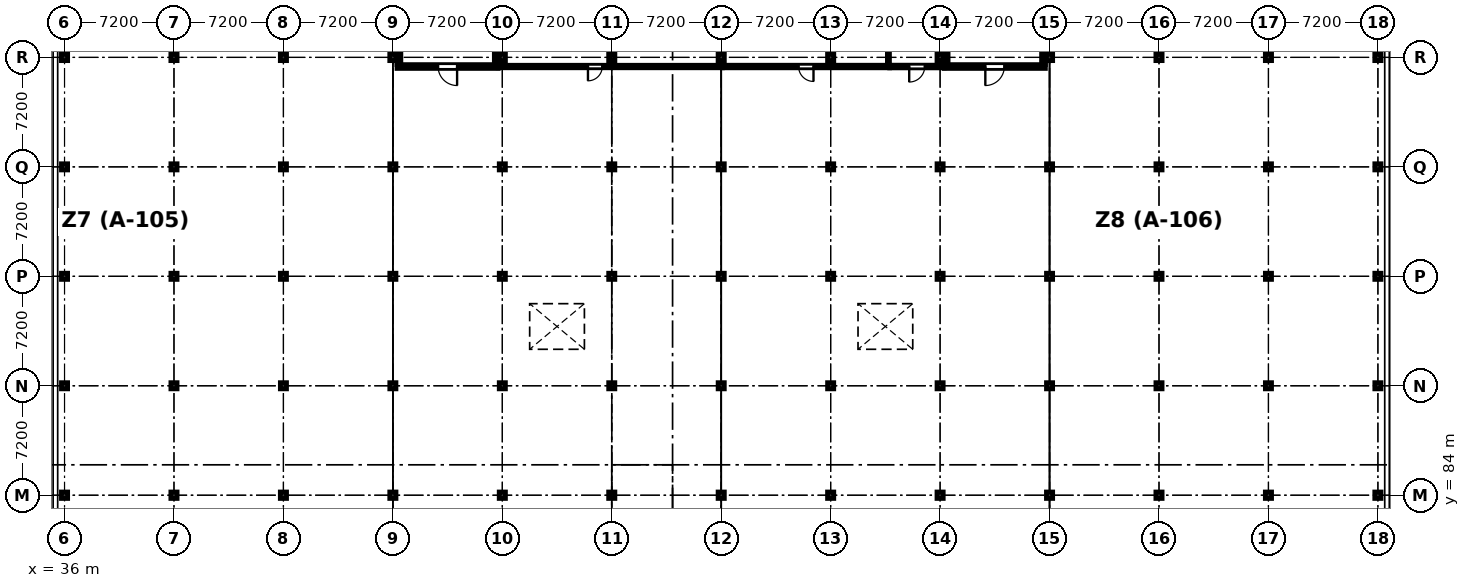
"""IFC4 building model, lengths in metres.
Left out: names, types, materials, properties, quantities, classifications, styles, units other than length and angle.
Written with IfcOpenShell. Run it as: python <this file> out.ifc"""

import sys

from ifc_helpers import new_model, si_unit, direction, frame, frame_2d, origin, origin_2d, place, context, subcontext, project, spatial, rectangle, i_section, extrude, element, fill, save


model = new_model("IFC4")
c1 = context("Model", 3, precision=1e-05, world=origin(), true_north=direction((0.0, 1.0)))
c2 = subcontext(c1, "Body", "Model", "MODEL_VIEW")
j1 = project(units=[si_unit("LENGTHUNIT", "METRE"), si_unit("PLANEANGLEUNIT", "RADIAN")], contexts=[c1])
p1 = place(None, origin())
s1 = spatial("IfcSite", under=j1, at=p1, CompositionType="ELEMENT")
p2 = place(p1, origin())
s2 = spatial("IfcBuilding", under=s1, at=p2, CompositionType="ELEMENT")
p3 = place(p2, frame((0.0, 0.0, -4.5)))
s3 = spatial("IfcBuildingStorey", under=s2, at=p3, CompositionType="ELEMENT", Elevation=-4.5)
p4 = place(p3, frame((36.0, 84.0, 0.0), z_axis=(0.0, 0.0, 1.0), x_axis=(1.0, 0.0, 0.0)))
e1 = element("IfcColumn", 1, at=p4, inside=s3, PredefinedType="COLUMN", context=c2, shape_type="SweptSolid", body=[
    extrude(i_section(OverallWidth=0.409, OverallDepth=0.424, WebThickness=0.033, FlangeThickness=0.052, FilletRadius=0.015, at=origin_2d()), origin(), (0.0, 0.0, 1.0), 4.5),
])
for number, where, z_axis, x_axis in (
    (2, (36.0, 91.2, 0.0), (0.0, 0.0, 1.0), (1.0, 0.0, 0.0)),
    (3, (36.0, 98.4, 0.0), (0.0, 0.0, 1.0), (1.0, 0.0, 0.0)),
    (4, (36.0, 105.6, 0.0), (0.0, 0.0, 1.0), (1.0, 0.0, 0.0)),
):
    element("IfcColumn", number, at=place(p3, frame(where, z_axis=z_axis, x_axis=x_axis)), inside=s3, PredefinedType="COLUMN", context=c2, shape_type="SweptSolid", body=[
        extrude(i_section(OverallWidth=0.404, OverallDepth=0.406, WebThickness=0.027, FlangeThickness=0.044, FilletRadius=0.015, at=origin_2d()), origin(), (0.0, 0.0, 1.0), 4.5),
    ])
for number, where, z_axis, x_axis in (
    (5, (36.0, 112.8, 0.0), (0.0, 0.0, 1.0), (1.0, 0.0, 0.0)),
    (6, (43.2, 84.0, 0.0), (0.0, 0.0, 1.0), (1.0, 0.0, 0.0)),
):
    element("IfcColumn", number, at=place(p3, frame(where, z_axis=z_axis, x_axis=x_axis)), inside=s3, PredefinedType="COLUMN", context=c2, shape_type="SweptSolid", body=[
        extrude(i_section(OverallWidth=0.409, OverallDepth=0.424, WebThickness=0.033, FlangeThickness=0.052, FilletRadius=0.015, at=origin_2d()), origin(), (0.0, 0.0, 1.0), 4.5),
    ])
for number, where, z_axis, x_axis in (
    (7, (43.2, 91.2, 0.0), (0.0, 0.0, 1.0), (1.0, 0.0, 0.0)),
    (8, (43.2, 98.4, 0.0), (0.0, 0.0, 1.0), (1.0, 0.0, 0.0)),
    (9, (43.2, 105.6, 0.0), (0.0, 0.0, 1.0), (1.0, 0.0, 0.0)),
):
    element("IfcColumn", number, at=place(p3, frame(where, z_axis=z_axis, x_axis=x_axis)), inside=s3, PredefinedType="COLUMN", context=c2, shape_type="SweptSolid", body=[
        extrude(i_section(OverallWidth=0.404, OverallDepth=0.406, WebThickness=0.027, FlangeThickness=0.044, FilletRadius=0.015, at=origin_2d()), origin(), (0.0, 0.0, 1.0), 4.5),
    ])
for number, where, z_axis, x_axis in (
    (10, (43.2, 112.8, 0.0), (0.0, 0.0, 1.0), (1.0, 0.0, 0.0)),
    (11, (50.4, 84.0, 0.0), (0.0, 0.0, 1.0), (1.0, 0.0, 0.0)),
):
    element("IfcColumn", number, at=place(p3, frame(where, z_axis=z_axis, x_axis=x_axis)), inside=s3, PredefinedType="COLUMN", context=c2, shape_type="SweptSolid", body=[
        extrude(i_section(OverallWidth=0.409, OverallDepth=0.424, WebThickness=0.033, FlangeThickness=0.052, FilletRadius=0.015, at=origin_2d()), origin(), (0.0, 0.0, 1.0), 4.5),
    ])
for number, where, z_axis, x_axis in (
    (12, (50.4, 91.2, 0.0), (0.0, 0.0, 1.0), (1.0, 0.0, 0.0)),
    (13, (50.4, 98.4, 0.0), (0.0, 0.0, 1.0), (1.0, 0.0, 0.0)),
    (14, (50.4, 105.6, 0.0), (0.0, 0.0, 1.0), (1.0, 0.0, 0.0)),
):
    element("IfcColumn", number, at=place(p3, frame(where, z_axis=z_axis, x_axis=x_axis)), inside=s3, PredefinedType="COLUMN", context=c2, shape_type="SweptSolid", body=[
        extrude(i_section(OverallWidth=0.404, OverallDepth=0.406, WebThickness=0.027, FlangeThickness=0.044, FilletRadius=0.015, at=origin_2d()), origin(), (0.0, 0.0, 1.0), 4.5),
    ])
for number, where, z_axis, x_axis in (
    (15, (50.4, 112.8, 0.0), (0.0, 0.0, 1.0), (1.0, 0.0, 0.0)),
    (16, (57.6, 84.0, 0.0), (0.0, 0.0, 1.0), (1.0, 0.0, 0.0)),
):
    element("IfcColumn", number, at=place(p3, frame(where, z_axis=z_axis, x_axis=x_axis)), inside=s3, PredefinedType="COLUMN", context=c2, shape_type="SweptSolid", body=[
        extrude(i_section(OverallWidth=0.409, OverallDepth=0.424, WebThickness=0.033, FlangeThickness=0.052, FilletRadius=0.015, at=origin_2d()), origin(), (0.0, 0.0, 1.0), 4.5),
    ])
for number, where, z_axis, x_axis in (
    (17, (57.6, 91.2, 0.0), (0.0, 0.0, 1.0), (1.0, 0.0, 0.0)),
    (18, (57.6, 98.4, 0.0), (0.0, 0.0, 1.0), (1.0, 0.0, 0.0)),
    (19, (57.6, 105.6, 0.0), (0.0, 0.0, 1.0), (1.0, 0.0, 0.0)),
):
    element("IfcColumn", number, at=place(p3, frame(where, z_axis=z_axis, x_axis=x_axis)), inside=s3, PredefinedType="COLUMN", context=c2, shape_type="SweptSolid", body=[
        extrude(i_section(OverallWidth=0.404, OverallDepth=0.406, WebThickness=0.027, FlangeThickness=0.044, FilletRadius=0.015, at=origin_2d()), origin(), (0.0, 0.0, 1.0), 4.5),
    ])
for number, where, z_axis, x_axis in (
    (20, (57.6, 112.8, 0.0), (0.0, 0.0, 1.0), (1.0, 0.0, 0.0)),
    (21, (64.8, 84.0, 0.0), (0.0, 0.0, 1.0), (1.0, 0.0, 0.0)),
):
    element("IfcColumn", number, at=place(p3, frame(where, z_axis=z_axis, x_axis=x_axis)), inside=s3, PredefinedType="COLUMN", context=c2, shape_type="SweptSolid", body=[
        extrude(i_section(OverallWidth=0.409, OverallDepth=0.424, WebThickness=0.033, FlangeThickness=0.052, FilletRadius=0.015, at=origin_2d()), origin(), (0.0, 0.0, 1.0), 4.5),
    ])
for number, where, z_axis, x_axis in (
    (22, (64.8, 91.2, 0.0), (0.0, 0.0, 1.0), (1.0, 0.0, 0.0)),
    (23, (64.8, 98.4, 0.0), (0.0, 0.0, 1.0), (1.0, 0.0, 0.0)),
    (24, (64.8, 105.6, 0.0), (0.0, 0.0, 1.0), (1.0, 0.0, 0.0)),
):
    element("IfcColumn", number, at=place(p3, frame(where, z_axis=z_axis, x_axis=x_axis)), inside=s3, PredefinedType="COLUMN", context=c2, shape_type="SweptSolid", body=[
        extrude(i_section(OverallWidth=0.404, OverallDepth=0.406, WebThickness=0.027, FlangeThickness=0.044, FilletRadius=0.015, at=origin_2d()), origin(), (0.0, 0.0, 1.0), 4.5),
    ])
for number, where, z_axis, x_axis in (
    (25, (64.8, 112.8, 0.0), (0.0, 0.0, 1.0), (1.0, 0.0, 0.0)),
    (26, (72.0, 84.0, 0.0), (0.0, 0.0, 1.0), (1.0, 0.0, 0.0)),
):
    element("IfcColumn", number, at=place(p3, frame(where, z_axis=z_axis, x_axis=x_axis)), inside=s3, PredefinedType="COLUMN", context=c2, shape_type="SweptSolid", body=[
        extrude(i_section(OverallWidth=0.409, OverallDepth=0.424, WebThickness=0.033, FlangeThickness=0.052, FilletRadius=0.015, at=origin_2d()), origin(), (0.0, 0.0, 1.0), 4.5),
    ])
for number, where, z_axis, x_axis in (
    (27, (72.0, 91.2, 0.0), (0.0, 0.0, 1.0), (1.0, 0.0, 0.0)),
    (28, (72.0, 98.4, 0.0), (0.0, 0.0, 1.0), (1.0, 0.0, 0.0)),
    (29, (72.0, 105.6, 0.0), (0.0, 0.0, 1.0), (1.0, 0.0, 0.0)),
):
    element("IfcColumn", number, at=place(p3, frame(where, z_axis=z_axis, x_axis=x_axis)), inside=s3, PredefinedType="COLUMN", context=c2, shape_type="SweptSolid", body=[
        extrude(i_section(OverallWidth=0.404, OverallDepth=0.406, WebThickness=0.027, FlangeThickness=0.044, FilletRadius=0.015, at=origin_2d()), origin(), (0.0, 0.0, 1.0), 4.5),
    ])
for number, where, z_axis, x_axis in (
    (30, (72.0, 112.8, 0.0), (0.0, 0.0, 1.0), (1.0, 0.0, 0.0)),
    (31, (79.2, 84.0, 0.0), (0.0, 0.0, 1.0), (1.0, 0.0, 0.0)),
):
    element("IfcColumn", number, at=place(p3, frame(where, z_axis=z_axis, x_axis=x_axis)), inside=s3, PredefinedType="COLUMN", context=c2, shape_type="SweptSolid", body=[
        extrude(i_section(OverallWidth=0.409, OverallDepth=0.424, WebThickness=0.033, FlangeThickness=0.052, FilletRadius=0.015, at=origin_2d()), origin(), (0.0, 0.0, 1.0), 4.5),
    ])
for number, where, z_axis, x_axis in (
    (32, (79.2, 91.2, 0.0), (0.0, 0.0, 1.0), (1.0, 0.0, 0.0)),
    (33, (79.2, 98.4, 0.0), (0.0, 0.0, 1.0), (1.0, 0.0, 0.0)),
    (34, (79.2, 105.6, 0.0), (0.0, 0.0, 1.0), (1.0, 0.0, 0.0)),
):
    element("IfcColumn", number, at=place(p3, frame(where, z_axis=z_axis, x_axis=x_axis)), inside=s3, PredefinedType="COLUMN", context=c2, shape_type="SweptSolid", body=[
        extrude(i_section(OverallWidth=0.404, OverallDepth=0.406, WebThickness=0.027, FlangeThickness=0.044, FilletRadius=0.015, at=origin_2d()), origin(), (0.0, 0.0, 1.0), 4.5),
    ])
for number, where, z_axis, x_axis in (
    (35, (79.2, 112.8, 0.0), (0.0, 0.0, 1.0), (1.0, 0.0, 0.0)),
    (36, (86.4, 84.0, 0.0), (0.0, 0.0, 1.0), (1.0, 0.0, 0.0)),
):
    element("IfcColumn", number, at=place(p3, frame(where, z_axis=z_axis, x_axis=x_axis)), inside=s3, PredefinedType="COLUMN", context=c2, shape_type="SweptSolid", body=[
        extrude(i_section(OverallWidth=0.409, OverallDepth=0.424, WebThickness=0.033, FlangeThickness=0.052, FilletRadius=0.015, at=origin_2d()), origin(), (0.0, 0.0, 1.0), 4.5),
    ])
for number, where, z_axis, x_axis in (
    (37, (86.4, 91.2, 0.0), (0.0, 0.0, 1.0), (1.0, 0.0, 0.0)),
    (38, (86.4, 98.4, 0.0), (0.0, 0.0, 1.0), (1.0, 0.0, 0.0)),
    (39, (86.4, 105.6, 0.0), (0.0, 0.0, 1.0), (1.0, 0.0, 0.0)),
):
    element("IfcColumn", number, at=place(p3, frame(where, z_axis=z_axis, x_axis=x_axis)), inside=s3, PredefinedType="COLUMN", context=c2, shape_type="SweptSolid", body=[
        extrude(i_section(OverallWidth=0.404, OverallDepth=0.406, WebThickness=0.027, FlangeThickness=0.044, FilletRadius=0.015, at=origin_2d()), origin(), (0.0, 0.0, 1.0), 4.5),
    ])
for number, where, z_axis, x_axis in (
    (40, (86.4, 112.8, 0.0), (0.0, 0.0, 1.0), (1.0, 0.0, 0.0)),
    (41, (93.6, 84.0, 0.0), (0.0, 0.0, 1.0), (1.0, 0.0, 0.0)),
):
    element("IfcColumn", number, at=place(p3, frame(where, z_axis=z_axis, x_axis=x_axis)), inside=s3, PredefinedType="COLUMN", context=c2, shape_type="SweptSolid", body=[
        extrude(i_section(OverallWidth=0.409, OverallDepth=0.424, WebThickness=0.033, FlangeThickness=0.052, FilletRadius=0.015, at=origin_2d()), origin(), (0.0, 0.0, 1.0), 4.5),
    ])
for number, where, z_axis, x_axis in (
    (42, (93.6, 91.2, 0.0), (0.0, 0.0, 1.0), (1.0, 0.0, 0.0)),
    (43, (93.6, 98.4, 0.0), (0.0, 0.0, 1.0), (1.0, 0.0, 0.0)),
    (44, (93.6, 105.6, 0.0), (0.0, 0.0, 1.0), (1.0, 0.0, 0.0)),
):
    element("IfcColumn", number, at=place(p3, frame(where, z_axis=z_axis, x_axis=x_axis)), inside=s3, PredefinedType="COLUMN", context=c2, shape_type="SweptSolid", body=[
        extrude(i_section(OverallWidth=0.404, OverallDepth=0.406, WebThickness=0.027, FlangeThickness=0.044, FilletRadius=0.015, at=origin_2d()), origin(), (0.0, 0.0, 1.0), 4.5),
    ])
for number, where, z_axis, x_axis in (
    (45, (93.6, 112.8, 0.0), (0.0, 0.0, 1.0), (1.0, 0.0, 0.0)),
    (46, (100.8, 84.0, 0.0), (0.0, 0.0, 1.0), (1.0, 0.0, 0.0)),
):
    element("IfcColumn", number, at=place(p3, frame(where, z_axis=z_axis, x_axis=x_axis)), inside=s3, PredefinedType="COLUMN", context=c2, shape_type="SweptSolid", body=[
        extrude(i_section(OverallWidth=0.409, OverallDepth=0.424, WebThickness=0.033, FlangeThickness=0.052, FilletRadius=0.015, at=origin_2d()), origin(), (0.0, 0.0, 1.0), 4.5),
    ])
for number, where, z_axis, x_axis in (
    (47, (100.8, 91.2, 0.0), (0.0, 0.0, 1.0), (1.0, 0.0, 0.0)),
    (48, (100.8, 98.4, 0.0), (0.0, 0.0, 1.0), (1.0, 0.0, 0.0)),
    (49, (100.8, 105.6, 0.0), (0.0, 0.0, 1.0), (1.0, 0.0, 0.0)),
):
    element("IfcColumn", number, at=place(p3, frame(where, z_axis=z_axis, x_axis=x_axis)), inside=s3, PredefinedType="COLUMN", context=c2, shape_type="SweptSolid", body=[
        extrude(i_section(OverallWidth=0.404, OverallDepth=0.406, WebThickness=0.027, FlangeThickness=0.044, FilletRadius=0.015, at=origin_2d()), origin(), (0.0, 0.0, 1.0), 4.5),
    ])
for number, where, z_axis, x_axis in (
    (50, (100.8, 112.8, 0.0), (0.0, 0.0, 1.0), (1.0, 0.0, 0.0)),
    (51, (108.0, 84.0, 0.0), (0.0, 0.0, 1.0), (1.0, 0.0, 0.0)),
):
    element("IfcColumn", number, at=place(p3, frame(where, z_axis=z_axis, x_axis=x_axis)), inside=s3, PredefinedType="COLUMN", context=c2, shape_type="SweptSolid", body=[
        extrude(i_section(OverallWidth=0.409, OverallDepth=0.424, WebThickness=0.033, FlangeThickness=0.052, FilletRadius=0.015, at=origin_2d()), origin(), (0.0, 0.0, 1.0), 4.5),
    ])
for number, where, z_axis, x_axis in (
    (52, (108.0, 91.2, 0.0), (0.0, 0.0, 1.0), (1.0, 0.0, 0.0)),
    (53, (108.0, 98.4, 0.0), (0.0, 0.0, 1.0), (1.0, 0.0, 0.0)),
    (54, (108.0, 105.6, 0.0), (0.0, 0.0, 1.0), (1.0, 0.0, 0.0)),
):
    element("IfcColumn", number, at=place(p3, frame(where, z_axis=z_axis, x_axis=x_axis)), inside=s3, PredefinedType="COLUMN", context=c2, shape_type="SweptSolid", body=[
        extrude(i_section(OverallWidth=0.404, OverallDepth=0.406, WebThickness=0.027, FlangeThickness=0.044, FilletRadius=0.015, at=origin_2d()), origin(), (0.0, 0.0, 1.0), 4.5),
    ])
for number, where, z_axis, x_axis in (
    (55, (108.0, 112.8, 0.0), (0.0, 0.0, 1.0), (1.0, 0.0, 0.0)),
    (56, (115.2, 84.0, 0.0), (0.0, 0.0, 1.0), (1.0, 0.0, 0.0)),
):
    element("IfcColumn", number, at=place(p3, frame(where, z_axis=z_axis, x_axis=x_axis)), inside=s3, PredefinedType="COLUMN", context=c2, shape_type="SweptSolid", body=[
        extrude(i_section(OverallWidth=0.409, OverallDepth=0.424, WebThickness=0.033, FlangeThickness=0.052, FilletRadius=0.015, at=origin_2d()), origin(), (0.0, 0.0, 1.0), 4.5),
    ])
for number, where, z_axis, x_axis in (
    (57, (115.2, 91.2, 0.0), (0.0, 0.0, 1.0), (1.0, 0.0, 0.0)),
    (58, (115.2, 98.4, 0.0), (0.0, 0.0, 1.0), (1.0, 0.0, 0.0)),
    (59, (115.2, 105.6, 0.0), (0.0, 0.0, 1.0), (1.0, 0.0, 0.0)),
):
    element("IfcColumn", number, at=place(p3, frame(where, z_axis=z_axis, x_axis=x_axis)), inside=s3, PredefinedType="COLUMN", context=c2, shape_type="SweptSolid", body=[
        extrude(i_section(OverallWidth=0.404, OverallDepth=0.406, WebThickness=0.027, FlangeThickness=0.044, FilletRadius=0.015, at=origin_2d()), origin(), (0.0, 0.0, 1.0), 4.5),
    ])
for number, where, z_axis, x_axis in (
    (60, (115.2, 112.8, 0.0), (0.0, 0.0, 1.0), (1.0, 0.0, 0.0)),
    (61, (122.4, 84.0, 0.0), (0.0, 0.0, 1.0), (1.0, 0.0, 0.0)),
):
    element("IfcColumn", number, at=place(p3, frame(where, z_axis=z_axis, x_axis=x_axis)), inside=s3, PredefinedType="COLUMN", context=c2, shape_type="SweptSolid", body=[
        extrude(i_section(OverallWidth=0.409, OverallDepth=0.424, WebThickness=0.033, FlangeThickness=0.052, FilletRadius=0.015, at=origin_2d()), origin(), (0.0, 0.0, 1.0), 4.5),
    ])
for number, where, z_axis, x_axis in (
    (62, (122.4, 91.2, 0.0), (0.0, 0.0, 1.0), (1.0, 0.0, 0.0)),
    (63, (122.4, 98.4, 0.0), (0.0, 0.0, 1.0), (1.0, 0.0, 0.0)),
    (64, (122.4, 105.6, 0.0), (0.0, 0.0, 1.0), (1.0, 0.0, 0.0)),
):
    element("IfcColumn", number, at=place(p3, frame(where, z_axis=z_axis, x_axis=x_axis)), inside=s3, PredefinedType="COLUMN", context=c2, shape_type="SweptSolid", body=[
        extrude(i_section(OverallWidth=0.404, OverallDepth=0.406, WebThickness=0.027, FlangeThickness=0.044, FilletRadius=0.015, at=origin_2d()), origin(), (0.0, 0.0, 1.0), 4.5),
    ])
p5 = place(p3, frame((122.4, 112.8, 0.0), z_axis=(0.0, 0.0, 1.0), x_axis=(1.0, 0.0, 0.0)))
e65 = element("IfcColumn", 65, at=p5, inside=s3, PredefinedType="COLUMN", context=c2, shape_type="SweptSolid", body=[
    extrude(i_section(OverallWidth=0.409, OverallDepth=0.424, WebThickness=0.033, FlangeThickness=0.052, FilletRadius=0.015, at=origin_2d()), origin(), (0.0, 0.0, 1.0), 4.5),
])
p6 = place(p3, frame((64.525, 112.2, 0.0), z_axis=(0.0, 0.0, 1.0), x_axis=(-1.0, 0.0, 0.0)))
e66 = element("IfcWall", 66, at=p6, inside=s3, PredefinedType="PARTITIONING", context=c2, shape_type="SweptSolid", body=[
    extrude(rectangle(XDim=6.65, YDim=0.25, at=frame_2d((3.325, 0.0))), origin(), (0.0, 0.0, 1.0), 3.443),
])
p7 = place(p6, frame((2.7, 0.0, 0.0)))
e67 = element("IfcOpeningElement", 67, at=p7, cuts=e66, PredefinedType="OPENING", context=c2, shape_type="SweptSolid", body=[
    extrude(rectangle(XDim=1.25, YDim=2.2, at=frame_2d((0.625, 1.1))), frame((0.0, 0.135, 0.0), z_axis=(0.0, -1.0, 0.0), x_axis=(1.0, 0.0, 0.0)), (0.0, 0.0, 1.0), 0.27),
])
for number, where, z_axis, x_axis in (
    (68, (58.0, 112.327, 0.0), (0.0, 0.0, 1.0), (0.0, 1.0, 0.0)),
    (69, (64.4, 115.998, 0.0), (0.0, 0.0, 1.0), (0.0, -1.0, 0.0)),
):
    element("IfcWall", number, at=place(p3, frame(where, z_axis=z_axis, x_axis=x_axis)), inside=s3, PredefinedType="PARTITIONING", context=c2, shape_type="SweptSolid", body=[
        extrude(rectangle(XDim=3.671, YDim=0.25, at=frame_2d((1.835, 0.0))), origin(), (0.0, 0.0, 1.0), 3.443),
    ])
p8 = place(p3, frame((100.525, 112.2, 0.0), z_axis=(0.0, 0.0, 1.0), x_axis=(-1.0, 0.0, 0.0)))
e70 = element("IfcWall", 70, at=p8, inside=s3, PredefinedType="PARTITIONING", context=c2, shape_type="SweptSolid", body=[
    extrude(rectangle(XDim=6.65, YDim=0.25, at=frame_2d((3.325, 0.0))), origin(), (0.0, 0.0, 1.0), 3.443),
])
p9 = place(p8, frame((2.7, 0.0, 0.0)))
e71 = element("IfcOpeningElement", 71, at=p9, cuts=e70, PredefinedType="OPENING", context=c2, shape_type="SweptSolid", body=[
    extrude(rectangle(XDim=1.25, YDim=2.2, at=frame_2d((0.625, 1.1))), frame((0.0, 0.135, 0.0), z_axis=(0.0, -1.0, 0.0), x_axis=(1.0, 0.0, 0.0)), (0.0, 0.0, 1.0), 0.27),
])
for number, where, z_axis, x_axis in (
    (72, (94.0, 112.327, 0.0), (0.0, 0.0, 1.0), (0.0, 1.0, 0.0)),
    (73, (100.4, 116.011, 0.0), (0.0, 0.0, 1.0), (0.0, -1.0, 0.0)),
):
    element("IfcWall", number, at=place(p3, frame(where, z_axis=z_axis, x_axis=x_axis)), inside=s3, PredefinedType="PARTITIONING", context=c2, shape_type="SweptSolid", body=[
        extrude(rectangle(XDim=3.684, YDim=0.25, at=frame_2d((1.842, 0.0))), origin(), (0.0, 0.0, 1.0), 3.443),
    ])
p10 = place(p3, frame((79.28, 112.2, 0.0), z_axis=(0.0, 0.0, 1.0), x_axis=(-1.0, 0.0, 0.0)))
e74 = element("IfcWall", 74, at=p10, inside=s3, PredefinedType="PARTITIONING", context=c2, shape_type="SweptSolid", body=[
    extrude(rectangle(XDim=14.753, YDim=0.165, at=frame_2d((7.376, 0.0))), origin(), (0.0, 0.0, 1.0), 3.443),
])
p11 = place(p10, frame((7.906, 0.0, 0.0)))
e75 = element("IfcOpeningElement", 75, at=p11, cuts=e74, PredefinedType="OPENING", context=c2, shape_type="SweptSolid", body=[
    extrude(rectangle(XDim=0.94, YDim=2.1, at=frame_2d((0.47, 1.05))), frame((0.0, 0.093, 0.0), z_axis=(0.0, -1.0, 0.0), x_axis=(1.0, 0.0, 0.0)), (0.0, 0.0, 1.0), 0.185),
])
p12 = place(p3, frame((90.28, 112.2, 0.0), z_axis=(0.0, 0.0, 1.0), x_axis=(-1.0, 0.0, 0.0)))
e76 = element("IfcWall", 76, at=p12, inside=s3, PredefinedType="PARTITIONING", context=c2, shape_type="SweptSolid", body=[
    extrude(rectangle(XDim=10.998, YDim=0.17, at=frame_2d((5.499, 0.0))), origin(), (0.0, 0.0, 1.0), 3.443),
])
p13 = place(p12, frame((5.009, 0.0, 0.0)))
e77 = element("IfcOpeningElement", 77, at=p13, cuts=e76, PredefinedType="OPENING", context=c2, shape_type="SweptSolid", body=[
    extrude(rectangle(XDim=0.98, YDim=2.1, at=frame_2d((0.49, 1.05))), frame((0.0, 0.095, 0.0), z_axis=(0.0, -1.0, 0.0), x_axis=(1.0, 0.0, 0.0)), (0.0, 0.0, 1.0), 0.19),
])
p14 = place(p3, frame((93.873, 112.2, 0.0), z_axis=(0.0, 0.0, 1.0), x_axis=(-1.0, 0.0, 0.0)))
e78 = element("IfcWall", 78, at=p14, inside=s3, PredefinedType="PARTITIONING", context=c2, shape_type="SweptSolid", body=[
    extrude(rectangle(XDim=3.591, YDim=0.178, at=frame_2d((1.795, 0.0))), origin(), (0.0, 0.0, 1.0), 3.443),
])
p15 = place(p14, frame((1.286, 0.0, 0.0)))
e79 = element("IfcOpeningElement", 79, at=p15, cuts=e78, PredefinedType="OPENING", context=c2, shape_type="SweptSolid", body=[
    extrude(rectangle(XDim=1.02, YDim=2.1, at=frame_2d((0.51, 1.05))), frame((0.0, 0.099, 0.0), z_axis=(0.0, -1.0, 0.0), x_axis=(1.0, 0.0, 0.0)), (0.0, 0.0, 1.0), 0.198),
])
p16 = place(p3, frame((79.2, 119.818, 0.0), z_axis=(0.0, 0.0, 1.0), x_axis=(0.0, -1.0, 0.0)))
e80 = element("IfcWall", 80, at=p16, inside=s3, PredefinedType="PARTITIONING", context=c2, shape_type="SweptSolid", body=[
    extrude(rectangle(XDim=7.531, YDim=0.13, at=frame_2d((3.766, 0.0))), origin(), (0.0, 0.0, 1.0), 3.443),
])
p17 = place(p3, frame((90.2, 119.818, 0.0), z_axis=(0.0, 0.0, 1.0), x_axis=(0.0, -1.0, 0.0)))
e81 = element("IfcWall", 81, at=p17, inside=s3, PredefinedType="PARTITIONING", context=c2, shape_type="SweptSolid", body=[
    extrude(rectangle(XDim=7.527, YDim=0.135, at=frame_2d((3.764, 0.0))), origin(), (0.0, 0.0, 1.0), 3.443),
])
p18 = place(p7, origin())
e82 = element("IfcDoor", 82, at=p18, inside=s3, OperationType="SINGLE_SWING_LEFT", PredefinedType="DOOR", context=c2, shape_type="SweptSolid", body=[
    extrude(rectangle(XDim=1.25, YDim=2.2, at=frame_2d((0.625, 1.1))), frame((0.0, 0.025, 0.0), z_axis=(0.0, -1.0, 0.0), x_axis=(1.0, 0.0, 0.0)), (0.0, 0.0, 1.0), 0.05),
])
fill(e67, e82)
p19 = place(p9, origin())
e83 = element("IfcDoor", 83, at=p19, inside=s3, OperationType="SINGLE_SWING_RIGHT", PredefinedType="DOOR", context=c2, shape_type="SweptSolid", body=[
    extrude(rectangle(XDim=1.25, YDim=2.2, at=frame_2d((0.625, 1.1))), frame((0.0, 0.025, 0.0), z_axis=(0.0, -1.0, 0.0), x_axis=(1.0, 0.0, 0.0)), (0.0, 0.0, 1.0), 0.05),
])
fill(e71, e83)
p20 = place(p11, origin())
e84 = element("IfcDoor", 84, at=p20, inside=s3, OperationType="SINGLE_SWING_RIGHT", PredefinedType="DOOR", context=c2, shape_type="SweptSolid", body=[
    extrude(rectangle(XDim=0.94, YDim=2.1, at=frame_2d((0.47, 1.05))), frame((0.0, 0.025, 0.0), z_axis=(0.0, -1.0, 0.0), x_axis=(1.0, 0.0, 0.0)), (0.0, 0.0, 1.0), 0.05),
])
fill(e75, e84)
p21 = place(p13, origin())
e85 = element("IfcDoor", 85, at=p21, inside=s3, OperationType="SINGLE_SWING_LEFT", PredefinedType="DOOR", context=c2, shape_type="SweptSolid", body=[
    extrude(rectangle(XDim=0.98, YDim=2.1, at=frame_2d((0.49, 1.05))), frame((0.0, 0.025, 0.0), z_axis=(0.0, -1.0, 0.0), x_axis=(1.0, 0.0, 0.0)), (0.0, 0.0, 1.0), 0.05),
])
fill(e77, e85)
p22 = place(p15, origin())
e86 = element("IfcDoor", 86, at=p22, inside=s3, OperationType="SINGLE_SWING_RIGHT", PredefinedType="DOOR", context=c2, shape_type="SweptSolid", body=[
    extrude(rectangle(XDim=1.02, YDim=2.1, at=frame_2d((0.51, 1.05))), frame((0.0, 0.025, 0.0), z_axis=(0.0, -1.0, 0.0), x_axis=(1.0, 0.0, 0.0)), (0.0, 0.0, 1.0), 0.05),
])
fill(e79, e86)
save(model, sys.argv[1])
